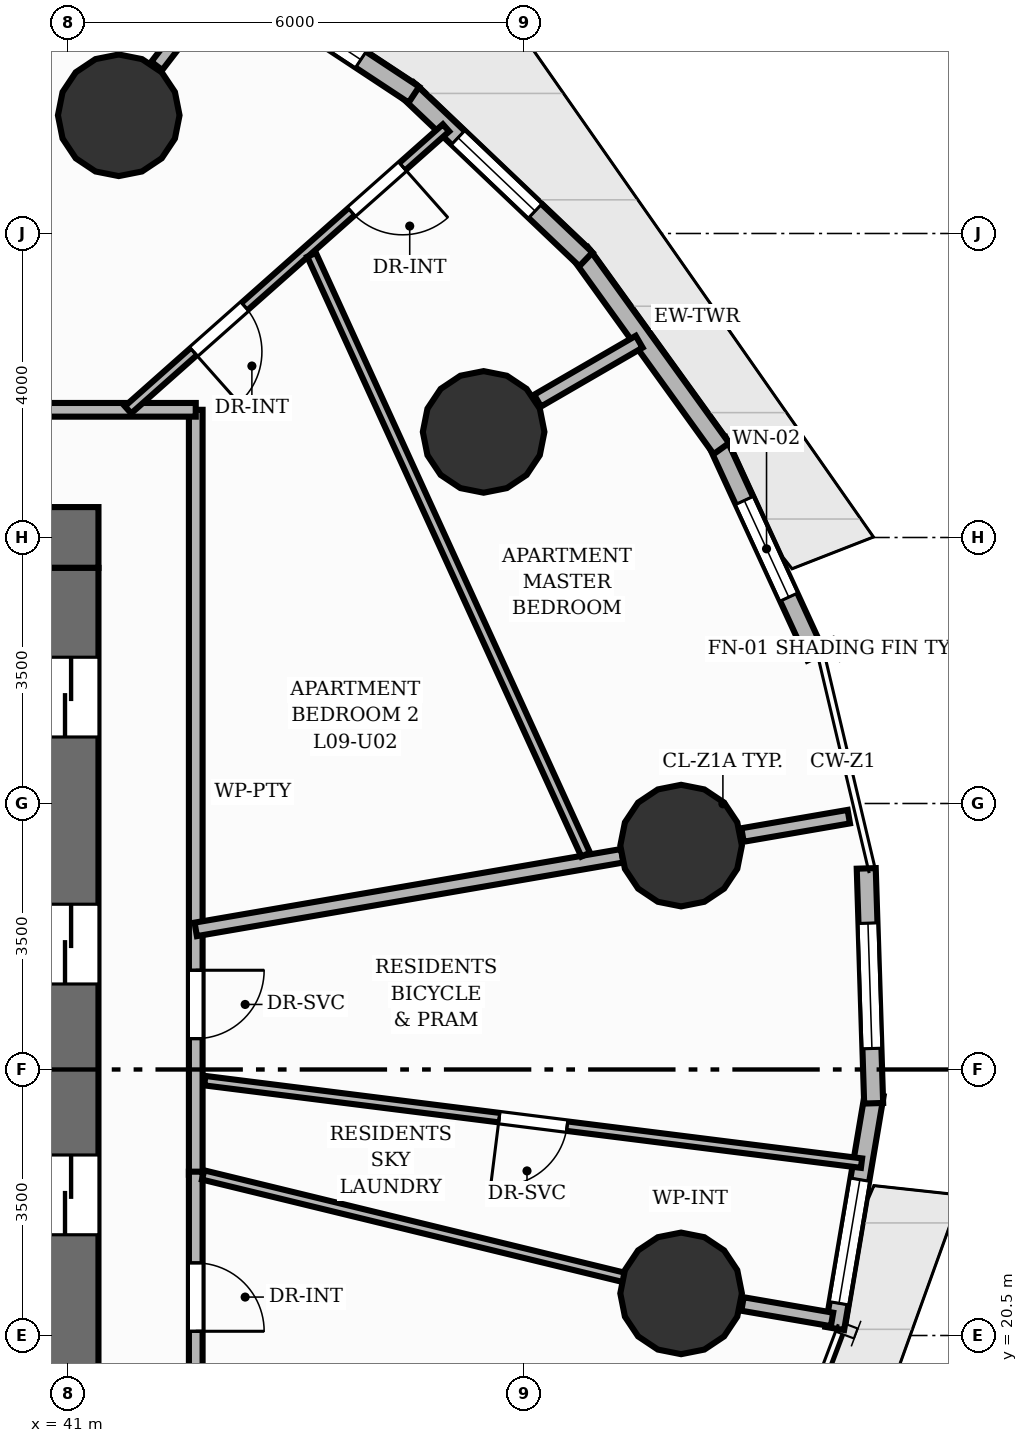
"""IFC4 building model, lengths in metres.
Left out: names, types, materials, properties, quantities, classifications, styles, units other than length and angle.
Written with IfcOpenShell. Run it as: python <this file> out.ifc"""

import sys

from ifc_helpers import new_model, si_unit, direction, frame, frame_2d, origin, origin_2d, place, context, subcontext, project, spatial, rectangle, circle, extrude, element, fill, save


model = new_model("IFC4")
c1 = context("Model", 3, precision=1e-05, world=origin(), true_north=direction((0.0, 1.0)))
c2 = subcontext(c1, "Body", "Model", "MODEL_VIEW")
j1 = project(units=[si_unit("LENGTHUNIT", "METRE"), si_unit("PLANEANGLEUNIT", "RADIAN")], contexts=[c1])
p1 = place(None, origin())
s1 = spatial("IfcSite", under=j1, at=p1, CompositionType="ELEMENT")
p2 = place(p1, origin())
s2 = spatial("IfcBuilding", under=s1, at=p2, CompositionType="ELEMENT")
p3 = place(p2, frame((0.0, 0.0, 34.4)))
s3 = spatial("IfcBuildingStorey", under=s2, at=p3, CompositionType="ELEMENT", Elevation=34.4)
p4 = place(p3, frame((22.6, 31.0, 0.0), z_axis=(0.0, 0.0, 1.0), x_axis=(1.0, 0.0, 0.0)))
e1 = element("IfcWall", 1, at=p4, inside=s3, PredefinedType="SHEAR", context=c2, shape_type="SweptSolid", body=[
    extrude(rectangle(XDim=18.8, YDim=0.8, at=frame_2d((9.4, 0.0))), origin(), (0.0, 0.0, 1.0), 3.2),
])
p5 = place(p4, frame((11.8, 0.0, 0.0)))
e2 = element("IfcOpeningElement", 2, at=p5, cuts=e1, PredefinedType="OPENING", context=c2, shape_type="SweptSolid", body=[
    extrude(rectangle(XDim=1.1, YDim=2.15, at=frame_2d((0.55, 1.075))), frame((0.0, 0.41, 0.0), z_axis=(0.0, -1.0, 0.0), x_axis=(1.0, 0.0, 0.0)), (0.0, 0.0, 1.0), 0.82),
])
p6 = place(p3, frame((41.0, 17.4, 0.0), z_axis=(0.0, 0.0, 1.0), x_axis=(0.0, 1.0, 0.0)))
e3 = element("IfcWall", 3, at=p6, inside=s3, PredefinedType="SHEAR", context=c2, shape_type="SweptSolid", body=[
    extrude(rectangle(XDim=13.2, YDim=0.8, at=frame_2d((6.6, 0.0))), origin(), (0.0, 0.0, 1.0), 3.2),
])
p7 = place(p6, frame((1.175, 0.0, 0.0)))
e4 = element("IfcOpeningElement", 4, at=p7, cuts=e3, PredefinedType="OPENING", context=c2, shape_type="SweptSolid", body=[
    extrude(rectangle(XDim=1.05, YDim=2.15, at=frame_2d((0.525, 1.075))), frame((0.0, 0.41, 0.0), z_axis=(0.0, -1.0, 0.0), x_axis=(1.0, 0.0, 0.0)), (0.0, 0.0, 1.0), 0.82),
])
p8 = place(p6, frame((4.425, 0.0, 0.0)))
e5 = element("IfcOpeningElement", 5, at=p8, cuts=e3, PredefinedType="OPENING", context=c2, shape_type="SweptSolid", body=[
    extrude(rectangle(XDim=1.05, YDim=2.15, at=frame_2d((0.525, 1.075))), frame((0.0, 0.41, 0.0), z_axis=(0.0, -1.0, 0.0), x_axis=(1.0, 0.0, 0.0)), (0.0, 0.0, 1.0), 0.82),
])
p9 = place(p6, frame((7.725, 0.0, 0.0)))
e6 = element("IfcOpeningElement", 6, at=p9, cuts=e3, PredefinedType="OPENING", context=c2, shape_type="SweptSolid", body=[
    extrude(rectangle(XDim=1.05, YDim=2.15, at=frame_2d((0.525, 1.075))), frame((0.0, 0.41, 0.0), z_axis=(0.0, -1.0, 0.0), x_axis=(1.0, 0.0, 0.0)), (0.0, 0.0, 1.0), 0.82),
])
p10 = place(p6, frame((10.975, 0.0, 0.0)))
e7 = element("IfcOpeningElement", 7, at=p10, cuts=e3, PredefinedType="OPENING", context=c2, shape_type="SweptSolid", body=[
    extrude(rectangle(XDim=1.05, YDim=2.15, at=frame_2d((0.525, 1.075))), frame((0.0, 0.41, 0.0), z_axis=(0.0, -1.0, 0.0), x_axis=(1.0, 0.0, 0.0)), (0.0, 0.0, 1.0), 0.82),
])
for number, where, z_axis, x_axis in (
    (8, (49.066, 26.946, 0.0), (0.0, 0.0, 1.0), (1.0, 0.0, 0.0)),
    (9, (46.468, 32.389, 0.0), (0.0, 0.0, 1.0), (1.0, 0.0, 0.0)),
    (10, (41.667, 36.555, 0.0), (0.0, 0.0, 1.0), (1.0, 0.0, 0.0)),
    (11, (49.066, 21.054, 0.0), (0.0, 0.0, 1.0), (1.0, 0.0, 0.0)),
):
    element("IfcColumn", number, at=place(p3, frame(where, z_axis=z_axis, x_axis=x_axis)), inside=s3, PredefinedType="COLUMN", context=c2, shape_type="SweptSolid", body=[
        extrude(circle(Radius=0.8, at=origin_2d()), origin(), (0.0, 0.0, 1.0), 3.2),
    ])
p11 = place(p3, frame((49.538, 32.268, 0.0), z_axis=(0.0, 0.0, 1.0), x_axis=(0.417872029175, -0.908505898293, 0.0)))
e12 = element("IfcWall", 12, at=p11, inside=s3, PredefinedType="SOLIDWALL", context=c2, shape_type="SweptSolid", body=[
    extrude(rectangle(XDim=3.12, YDim=0.25, at=frame_2d((1.56, 0.0))), origin(), (0.0, 0.0, 1.0), 2.96),
])
p12 = place(p11, frame((0.86, 0.0, 0.85)))
e13 = element("IfcOpeningElement", 13, at=p12, cuts=e12, PredefinedType="OPENING", context=c2, shape_type="SweptSolid", body=[
    extrude(rectangle(XDim=1.4, YDim=1.55, at=frame_2d((0.7, 0.775))), frame((0.0, 0.135, 0.0), z_axis=(0.0, -1.0, 0.0), x_axis=(1.0, 0.0, 0.0)), (0.0, 0.0, 1.0), 0.27),
])
p13 = place(p3, frame((47.739, 34.745, 0.0), z_axis=(0.0, 0.0, 1.0), x_axis=(0.584805106467, -0.811173833066, 0.0)))
e14 = element("IfcWall", 14, at=p13, inside=s3, PredefinedType="SOLIDWALL", context=c2, shape_type="SweptSolid", body=[
    extrude(rectangle(XDim=3.174, YDim=0.25, at=frame_2d((1.587, 0.0))), origin(), (0.0, 0.0, 1.0), 2.96),
])
p14 = place(p3, frame((45.462, 36.896, 0.0), z_axis=(0.0, 0.0, 1.0), x_axis=(0.724569059836, -0.689202203659, 0.0)))
e15 = element("IfcWall", 15, at=p14, inside=s3, PredefinedType="SOLIDWALL", context=c2, shape_type="SweptSolid", body=[
    extrude(rectangle(XDim=3.244, YDim=0.25, at=frame_2d((1.622, 0.0))), origin(), (0.0, 0.0, 1.0), 2.96),
])
p15 = place(p14, frame((0.922, 0.0, 0.85)))
e16 = element("IfcOpeningElement", 16, at=p15, cuts=e15, PredefinedType="OPENING", context=c2, shape_type="SweptSolid", body=[
    extrude(rectangle(XDim=1.4, YDim=1.55, at=frame_2d((0.7, 0.775))), frame((0.0, 0.135, 0.0), z_axis=(0.0, -1.0, 0.0), x_axis=(1.0, 0.0, 0.0)), (0.0, 0.0, 1.0), 0.27),
])
p16 = place(p3, frame((42.777, 38.656, 0.0), z_axis=(0.0, 0.0, 1.0), x_axis=(0.834663448541, -0.550760317805, 0.0)))
e17 = element("IfcWall", 17, at=p16, inside=s3, PredefinedType="SOLIDWALL", context=c2, shape_type="SweptSolid", body=[
    extrude(rectangle(XDim=3.323, YDim=0.25, at=frame_2d((1.661, 0.0))), origin(), (0.0, 0.0, 1.0), 2.96),
])
p17 = place(p16, frame((0.836, 0.0, 0.85)))
e18 = element("IfcOpeningElement", 18, at=p17, cuts=e17, PredefinedType="OPENING", context=c2, shape_type="SweptSolid", body=[
    extrude(rectangle(XDim=1.65, YDim=1.55, at=frame_2d((0.825, 0.775))), frame((0.0, 0.135, 0.0), z_axis=(0.0, -1.0, 0.0), x_axis=(1.0, 0.0, 0.0)), (0.0, 0.0, 1.0), 0.27),
])
p18 = place(p3, frame((51.607, 23.67, 0.0), z_axis=(0.0, 0.0, 1.0), x_axis=(-0.166403122634, -0.98605780803, 0.0)))
e19 = element("IfcWall", 19, at=p18, inside=s3, PredefinedType="SOLIDWALL", context=c2, shape_type="SweptSolid", body=[
    extrude(rectangle(XDim=3.121, YDim=0.25, at=frame_2d((1.56, 0.0))), origin(), (0.0, 0.0, 1.0), 2.96),
])
p19 = place(p18, frame((1.135, 0.0, 0.85)))
e20 = element("IfcOpeningElement", 20, at=p19, cuts=e19, PredefinedType="OPENING", context=c2, shape_type="SweptSolid", body=[
    extrude(rectangle(XDim=1.65, YDim=1.29, at=frame_2d((0.825, 0.645))), frame((0.0, 0.135, 0.0), z_axis=(0.0, -1.0, 0.0), x_axis=(1.0, 0.0, 0.0)), (0.0, 0.0, 1.0), 0.27),
])
p20 = place(p3, frame((51.501, 26.646, 0.0), z_axis=(0.0, 0.0, 1.0), x_axis=(0.031584802517, -0.999501075662, 0.0)))
e21 = element("IfcWall", 21, at=p20, inside=s3, PredefinedType="SOLIDWALL", context=c2, shape_type="SweptSolid", body=[
    extrude(rectangle(XDim=3.092, YDim=0.25, at=frame_2d((1.546, 0.0))), origin(), (0.0, 0.0, 1.0), 2.96),
])
p21 = place(p20, frame((0.721, 0.0, 0.85)))
e22 = element("IfcOpeningElement", 22, at=p21, cuts=e21, PredefinedType="OPENING", context=c2, shape_type="SweptSolid", body=[
    extrude(rectangle(XDim=1.65, YDim=1.55, at=frame_2d((0.825, 0.775))), frame((0.0, 0.135, 0.0), z_axis=(0.0, -1.0, 0.0), x_axis=(1.0, 0.0, 0.0)), (0.0, 0.0, 1.0), 0.27),
])
p22 = place(p3, frame((49.874, 27.085, 0.0), z_axis=(0.0, 0.0, 1.0), x_axis=(0.985419363098, 0.170143112797, 0.0)))
e23 = element("IfcWall", 23, at=p22, inside=s3, PredefinedType="PARTITIONING", context=c2, shape_type="SweptSolid", body=[
    extrude(rectangle(XDim=1.419, YDim=0.18, at=frame_2d((0.709, 0.0))), origin(), (0.0, 0.0, 1.0), 2.178),
])
p23 = place(p3, frame((47.177, 32.8, 0.0), z_axis=(0.0, 0.0, 1.0), x_axis=(0.865036673907, 0.501708633369, 0.0)))
e24 = element("IfcWall", 24, at=p23, inside=s3, PredefinedType="PARTITIONING", context=c2, shape_type="SweptSolid", body=[
    extrude(rectangle(XDim=1.545, YDim=0.18, at=frame_2d((0.773, 0.0))), origin(), (0.0, 0.0, 1.0), 2.178),
])
p24 = place(p3, frame((42.167, 37.205, 0.0), z_axis=(0.0, 0.0, 1.0), x_axis=(0.609978856004, 0.792417689876, 0.0)))
e25 = element("IfcWall", 25, at=p24, inside=s3, PredefinedType="PARTITIONING", context=c2, shape_type="SweptSolid", body=[
    extrude(rectangle(XDim=1.496, YDim=0.18, at=frame_2d((0.748, 0.0))), origin(), (0.0, 0.0, 1.0), 2.178),
])
p25 = place(p3, frame((49.874, 20.915, 0.0), z_axis=(0.0, 0.0, 1.0), x_axis=(0.98541644509, -0.170160012181, 0.0)))
e26 = element("IfcWall", 26, at=p25, inside=s3, PredefinedType="PARTITIONING", context=c2, shape_type="SweptSolid", body=[
    extrude(rectangle(XDim=1.195, YDim=0.18, at=frame_2d((0.598, 0.0))), origin(), (0.0, 0.0, 1.0), 2.178),
])
p26 = place(p3, frame((42.68, 32.68, 0.0), z_axis=(0.0, 0.0, 1.0), x_axis=(0.0, -1.0, 0.0)))
e27 = element("IfcWall", 27, at=p26, inside=s3, PredefinedType="PARTITIONING", context=c2, shape_type="SweptSolid", body=[
    extrude(rectangle(XDim=10.065, YDim=0.18, at=frame_2d((5.032, 0.0))), origin(), (0.0, 0.0, 1.0), 2.955),
])
p27 = place(p26, frame((7.374, 0.0, 0.0)))
e28 = element("IfcOpeningElement", 28, at=p27, cuts=e27, PredefinedType="OPENING", context=c2, shape_type="SweptSolid", body=[
    extrude(rectangle(XDim=0.9, YDim=2.1, at=frame_2d((0.45, 1.05))), frame((0.0, 0.1, 0.0), z_axis=(0.0, -1.0, 0.0), x_axis=(1.0, 0.0, 0.0)), (0.0, 0.0, 1.0), 0.2),
])
p28 = place(p3, frame((42.68, 22.656, 0.0), z_axis=(0.0, 0.0, 1.0), x_axis=(0.0, -1.0, 0.0)))
e29 = element("IfcWall", 29, at=p28, inside=s3, PredefinedType="PARTITIONING", context=c2, shape_type="SweptSolid", body=[
    extrude(rectangle(XDim=7.335, YDim=0.18, at=frame_2d((3.668, 0.0))), origin(), (0.0, 0.0, 1.0), 2.955),
])
p29 = place(p28, frame((1.2, 0.0, 0.0)))
e30 = element("IfcOpeningElement", 30, at=p29, cuts=e29, PredefinedType="OPENING", context=c2, shape_type="SweptSolid", body=[
    extrude(rectangle(XDim=0.9, YDim=2.1, at=frame_2d((0.45, 1.05))), frame((0.0, 0.1, 0.0), z_axis=(0.0, -1.0, 0.0), x_axis=(1.0, 0.0, 0.0)), (0.0, 0.0, 1.0), 0.2),
])
p30 = place(p28, frame((4.846, 0.0, 0.0)))
e31 = element("IfcOpeningElement", 31, at=p30, cuts=e29, PredefinedType="OPENING", context=c2, shape_type="SweptSolid", body=[
    extrude(rectangle(XDim=0.9, YDim=2.1, at=frame_2d((0.45, 1.05))), frame((0.0, 0.1, 0.0), z_axis=(0.0, -1.0, 0.0), x_axis=(1.0, 0.0, 0.0)), (0.0, 0.0, 1.0), 0.2),
])
p31 = place(p3, frame((21.32, 32.68, 0.0), z_axis=(0.0, 0.0, 1.0), x_axis=(1.0, 0.0, 0.0)))
e32 = element("IfcWall", 32, at=p31, inside=s3, PredefinedType="PARTITIONING", context=c2, shape_type="SweptSolid", body=[
    extrude(rectangle(XDim=21.36, YDim=0.18, at=frame_2d((10.68, 0.0))), origin(), (0.0, 0.0, 1.0), 2.955),
])
p32 = place(p31, frame((17.013, 0.0, 0.0)))
e33 = element("IfcOpeningElement", 33, at=p32, cuts=e32, PredefinedType="OPENING", context=c2, shape_type="SweptSolid", body=[
    extrude(rectangle(XDim=1.05, YDim=2.15, at=frame_2d((0.525, 1.075))), frame((0.0, 0.1, 0.0), z_axis=(0.0, -1.0, 0.0), x_axis=(1.0, 0.0, 0.0)), (0.0, 0.0, 1.0), 0.2),
])
p33 = place(p31, frame((5.82, 0.0, 0.0)))
e34 = element("IfcOpeningElement", 34, at=p33, cuts=e32, PredefinedType="OPENING", context=c2, shape_type="SweptSolid", body=[
    extrude(rectangle(XDim=1.05, YDim=2.15, at=frame_2d((0.525, 1.075))), frame((0.0, 0.1, 0.0), z_axis=(0.0, -1.0, 0.0), x_axis=(1.0, 0.0, 0.0)), (0.0, 0.0, 1.0), 0.2),
])
p34 = place(p3, frame((51.439, 22.768, 0.0), z_axis=(0.0, 0.0, 1.0), x_axis=(-0.992204813033, 0.124617851825, 0.0)))
e35 = element("IfcWall", 35, at=p34, inside=s3, PredefinedType="PARTITIONING", context=c2, shape_type="SweptSolid", body=[
    extrude(rectangle(XDim=8.708, YDim=0.125, at=frame_2d((4.354, 0.0))), origin(), (0.0, 0.0, 1.0), 2.642),
])
p35 = place(p34, frame((3.904, 0.0, 0.0)))
e36 = element("IfcOpeningElement", 36, at=p35, cuts=e35, PredefinedType="OPENING", context=c2, shape_type="SweptSolid", body=[
    extrude(rectangle(XDim=0.9, YDim=2.1, at=frame_2d((0.45, 1.05))), frame((0.0, 0.073, 0.0), z_axis=(0.0, -1.0, 0.0), x_axis=(1.0, 0.0, 0.0)), (0.0, 0.0, 1.0), 0.145),
])
p36 = place(p3, frame((42.68, 25.844, 0.0), z_axis=(0.0, 0.0, 1.0), x_axis=(0.98542122422, 0.170132333364, 0.0)))
e37 = element("IfcWall", 37, at=p36, inside=s3, PredefinedType="PARTITIONING", context=c2, shape_type="SweptSolid", body=[
    extrude(rectangle(XDim=5.694, YDim=0.18, at=frame_2d((2.847, 0.0))), origin(), (0.0, 0.0, 1.0), 2.178),
])
p37 = place(p3, frame((42.777, 22.612, 0.0), z_axis=(0.0, 0.0, 1.0), x_axis=(0.971633604644, -0.236491307083, 0.0)))
e38 = element("IfcWall", 38, at=p37, inside=s3, PredefinedType="PARTITIONING", context=c2, shape_type="SweptSolid", body=[
    extrude(rectangle(XDim=5.707, YDim=0.125, at=frame_2d((2.854, 0.0))), origin(), (0.0, 0.0, 1.0), 2.178),
])
p38 = place(p3, frame((45.973, 36.39, 0.0), z_axis=(0.0, 0.0, 1.0), x_axis=(-0.748208515509, -0.663463651845, 0.0)))
e39 = element("IfcWall", 39, at=p38, inside=s3, PredefinedType="PARTITIONING", context=c2, shape_type="SweptSolid", body=[
    extrude(rectangle(XDim=5.592, YDim=0.125, at=frame_2d((2.796, 0.0))), origin(), (0.0, 0.0, 1.0), 2.955),
])
p39 = place(p38, frame((0.765, 0.0, 0.0)))
e40 = element("IfcOpeningElement", 40, at=p39, cuts=e39, PredefinedType="OPENING", context=c2, shape_type="SweptSolid", body=[
    extrude(rectangle(XDim=0.9, YDim=2.1, at=frame_2d((0.45, 1.05))), frame((0.0, 0.073, 0.0), z_axis=(0.0, -1.0, 0.0), x_axis=(1.0, 0.0, 0.0)), (0.0, 0.0, 1.0), 0.145),
])
p40 = place(p38, frame((3.54, 0.0, 0.0)))
e41 = element("IfcOpeningElement", 41, at=p40, cuts=e39, PredefinedType="OPENING", context=c2, shape_type="SweptSolid", body=[
    extrude(rectangle(XDim=0.9, YDim=2.1, at=frame_2d((0.45, 1.05))), frame((0.0, 0.073, 0.0), z_axis=(0.0, -1.0, 0.0), x_axis=(1.0, 0.0, 0.0)), (0.0, 0.0, 1.0), 0.145),
])
p41 = place(p3, frame((47.81, 26.827, 0.0), z_axis=(0.0, 0.0, 1.0), x_axis=(-0.41559351113, 0.909550456823, 0.0)))
e42 = element("IfcWall", 42, at=p41, inside=s3, PredefinedType="PARTITIONING", context=c2, shape_type="SweptSolid", body=[
    extrude(rectangle(XDim=8.677, YDim=0.125, at=frame_2d((4.338, 0.0))), origin(), (0.0, 0.0, 1.0), 2.328),
])
p42 = place(p12, origin())
e43 = element("IfcWindow", 43, at=p42, inside=s3, PartitioningType="SINGLE_PANEL", PredefinedType="WINDOW", context=c2, shape_type="SweptSolid", body=[
    extrude(rectangle(XDim=1.4, YDim=1.55, at=frame_2d((0.7, 0.775))), frame((0.0, 0.03, 0.0), z_axis=(0.0, -1.0, 0.0), x_axis=(1.0, 0.0, 0.0)), (0.0, 0.0, 1.0), 0.06),
])
fill(e13, e43)
p43 = place(p15, origin())
e44 = element("IfcWindow", 44, at=p43, inside=s3, PartitioningType="SINGLE_PANEL", PredefinedType="WINDOW", context=c2, shape_type="SweptSolid", body=[
    extrude(rectangle(XDim=1.4, YDim=1.55, at=frame_2d((0.7, 0.775))), frame((0.0, 0.03, 0.0), z_axis=(0.0, -1.0, 0.0), x_axis=(1.0, 0.0, 0.0)), (0.0, 0.0, 1.0), 0.06),
])
fill(e16, e44)
p44 = place(p17, origin())
e45 = element("IfcWindow", 45, at=p44, inside=s3, PartitioningType="SINGLE_PANEL", PredefinedType="WINDOW", context=c2, shape_type="SweptSolid", body=[
    extrude(rectangle(XDim=1.65, YDim=1.55, at=frame_2d((0.825, 0.775))), frame((0.0, 0.03, 0.0), z_axis=(0.0, -1.0, 0.0), x_axis=(1.0, 0.0, 0.0)), (0.0, 0.0, 1.0), 0.06),
])
fill(e18, e45)
p45 = place(p19, origin())
e46 = element("IfcWindow", 46, at=p45, inside=s3, PartitioningType="SINGLE_PANEL", PredefinedType="WINDOW", context=c2, shape_type="SweptSolid", body=[
    extrude(rectangle(XDim=1.65, YDim=1.29, at=frame_2d((0.825, 0.645))), frame((0.0, 0.03, 0.0), z_axis=(0.0, -1.0, 0.0), x_axis=(1.0, 0.0, 0.0)), (0.0, 0.0, 1.0), 0.06),
])
fill(e20, e46)
p46 = place(p21, origin())
e47 = element("IfcWindow", 47, at=p46, inside=s3, PartitioningType="SINGLE_PANEL", PredefinedType="WINDOW", context=c2, shape_type="SweptSolid", body=[
    extrude(rectangle(XDim=1.65, YDim=1.55, at=frame_2d((0.825, 0.775))), frame((0.0, 0.03, 0.0), z_axis=(0.0, -1.0, 0.0), x_axis=(1.0, 0.0, 0.0)), (0.0, 0.0, 1.0), 0.06),
])
fill(e22, e47)
p47 = place(p8, origin())
e48 = element("IfcDoor", 48, at=p47, inside=s3, OperationType="DOUBLE_DOOR_SLIDING", PredefinedType="DOOR", context=c2, shape_type="SweptSolid", body=[
    extrude(rectangle(XDim=1.05, YDim=2.15, at=frame_2d((0.525, 1.075))), frame((0.0, 0.025, 0.0), z_axis=(0.0, -1.0, 0.0), x_axis=(1.0, 0.0, 0.0)), (0.0, 0.0, 1.0), 0.05),
])
fill(e5, e48)
p48 = place(p9, origin())
e49 = element("IfcDoor", 49, at=p48, inside=s3, OperationType="DOUBLE_DOOR_SLIDING", PredefinedType="DOOR", context=c2, shape_type="SweptSolid", body=[
    extrude(rectangle(XDim=1.05, YDim=2.15, at=frame_2d((0.525, 1.075))), frame((0.0, 0.025, 0.0), z_axis=(0.0, -1.0, 0.0), x_axis=(1.0, 0.0, 0.0)), (0.0, 0.0, 1.0), 0.05),
])
fill(e6, e49)
p49 = place(p10, origin())
e50 = element("IfcDoor", 50, at=p49, inside=s3, OperationType="DOUBLE_DOOR_SLIDING", PredefinedType="DOOR", context=c2, shape_type="SweptSolid", body=[
    extrude(rectangle(XDim=1.05, YDim=2.15, at=frame_2d((0.525, 1.075))), frame((0.0, 0.025, 0.0), z_axis=(0.0, -1.0, 0.0), x_axis=(1.0, 0.0, 0.0)), (0.0, 0.0, 1.0), 0.05),
])
fill(e7, e50)
p50 = place(p27, origin())
e51 = element("IfcDoor", 51, at=p50, inside=s3, OperationType="SINGLE_SWING_LEFT", PredefinedType="DOOR", context=c2, shape_type="SweptSolid", body=[
    extrude(rectangle(XDim=0.9, YDim=2.1, at=frame_2d((0.45, 1.05))), frame((0.0, 0.025, 0.0), z_axis=(0.0, -1.0, 0.0), x_axis=(1.0, 0.0, 0.0)), (0.0, 0.0, 1.0), 0.05),
])
fill(e28, e51)
p51 = place(p29, origin())
e52 = element("IfcDoor", 52, at=p51, inside=s3, OperationType="SINGLE_SWING_RIGHT", PredefinedType="DOOR", context=c2, shape_type="SweptSolid", body=[
    extrude(rectangle(XDim=0.9, YDim=2.1, at=frame_2d((0.45, 1.05))), frame((0.0, 0.025, 0.0), z_axis=(0.0, -1.0, 0.0), x_axis=(1.0, 0.0, 0.0)), (0.0, 0.0, 1.0), 0.05),
])
fill(e30, e52)
p52 = place(p35, origin())
e53 = element("IfcDoor", 53, at=p52, inside=s3, OperationType="SINGLE_SWING_RIGHT", PredefinedType="DOOR", context=c2, shape_type="SweptSolid", body=[
    extrude(rectangle(XDim=0.9, YDim=2.1, at=frame_2d((0.45, 1.05))), frame((0.0, 0.025, 0.0), z_axis=(0.0, -1.0, 0.0), x_axis=(1.0, 0.0, 0.0)), (0.0, 0.0, 1.0), 0.05),
])
fill(e36, e53)
p53 = place(p39, origin())
e54 = element("IfcDoor", 54, at=p53, inside=s3, OperationType="SINGLE_SWING_LEFT", PredefinedType="DOOR", context=c2, shape_type="SweptSolid", body=[
    extrude(rectangle(XDim=0.9, YDim=2.1, at=frame_2d((0.45, 1.05))), frame((0.0, 0.025, 0.0), z_axis=(0.0, -1.0, 0.0), x_axis=(1.0, 0.0, 0.0)), (0.0, 0.0, 1.0), 0.05),
])
fill(e40, e54)
p54 = place(p40, origin())
e55 = element("IfcDoor", 55, at=p54, inside=s3, OperationType="SINGLE_SWING_RIGHT", PredefinedType="DOOR", context=c2, shape_type="SweptSolid", body=[
    extrude(rectangle(XDim=0.9, YDim=2.1, at=frame_2d((0.45, 1.05))), frame((0.0, 0.025, 0.0), z_axis=(0.0, -1.0, 0.0), x_axis=(1.0, 0.0, 0.0)), (0.0, 0.0, 1.0), 0.05),
])
fill(e41, e55)
save(model, sys.argv[1])
